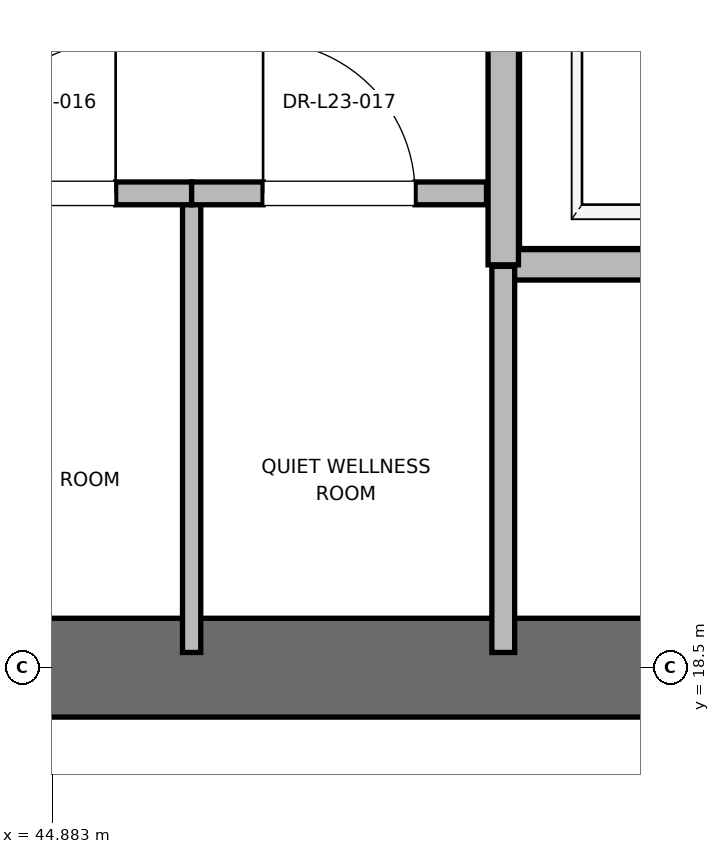
"""IFC4 building model, lengths in metres.
Left out: names, types, materials, properties, quantities, classifications, styles, units other than length and angle.
Written with IfcOpenShell. Run it as: python <this file> out.ifc"""

import sys

from ifc_helpers import new_model, si_unit, direction, frame, frame_2d, origin, place, context, subcontext, project, spatial, rectangle, extrude, element, fill, save


model = new_model("IFC4")
c1 = context("Model", 3, precision=1e-05, world=origin(), true_north=direction((0.0, 1.0)))
c2 = subcontext(c1, "Body", "Model", "MODEL_VIEW")
j1 = project(units=[si_unit("LENGTHUNIT", "METRE"), si_unit("PLANEANGLEUNIT", "RADIAN")], contexts=[c1])
p1 = place(None, origin())
s1 = spatial("IfcSite", under=j1, at=p1, CompositionType="ELEMENT")
p2 = place(p1, origin())
s2 = spatial("IfcBuilding", under=s1, at=p2, CompositionType="ELEMENT")
p3 = place(p2, frame((0.0, 0.0, 99.6)))
s3 = spatial("IfcBuildingStorey", under=s2, at=p3, CompositionType="ELEMENT", Elevation=99.6)
p4 = place(p3, frame((41.8, 18.5, 0.0), z_axis=(0.0, 0.0, 1.0), x_axis=(1.0, 0.0, 0.0)))
e1 = element("IfcWall", 1, at=p4, inside=s3, PredefinedType="SHEAR", context=c2, shape_type="SweptSolid", body=[
    extrude(rectangle(XDim=9.2, YDim=0.65, at=frame_2d((4.6, 0.0))), origin(), (0.0, 0.0, 1.0), 3.76),
])
p5 = place(p3, frame((47.85, 21.15, 0.0), z_axis=(0.0, 0.0, 1.0), x_axis=(1.0, 0.0, 0.0)))
e2 = element("IfcWall", 2, at=p5, inside=s3, PredefinedType="SOLIDWALL", context=c2, shape_type="SweptSolid", body=[
    extrude(rectangle(XDim=2.6, YDim=0.2, at=frame_2d((1.3, 0.0))), origin(), (0.0, 0.0, 1.0), 3.76),
])
p6 = place(p3, frame((47.85, 24.15, 0.0), z_axis=(0.0, 0.0, 1.0), x_axis=(0.0, -1.0, 0.0)))
e3 = element("IfcWall", 3, at=p6, inside=s3, PredefinedType="SOLIDWALL", context=c2, shape_type="SweptSolid", body=[
    extrude(rectangle(XDim=3.0, YDim=0.2, at=frame_2d((1.5, 0.0))), origin(), (0.0, 0.0, 1.0), 3.76),
])
p7 = place(p3, frame((47.85, 18.6, 0.0), z_axis=(0.0, 0.0, 1.0), x_axis=(0.0, 1.0, 0.0)))
e4 = element("IfcWall", 4, at=p7, inside=s3, PredefinedType="PARTITIONING", context=c2, shape_type="SweptSolid", body=[
    extrude(rectangle(XDim=2.54, YDim=0.15, at=frame_2d((1.27, 0.0))), origin(), (0.0, 0.0, 1.0), 2.85),
])
p8 = place(p3, frame((45.8, 18.6, 0.0), z_axis=(0.0, 0.0, 1.0), x_axis=(0.0, 1.0, 0.0)))
e5 = element("IfcWall", 5, at=p8, inside=s3, PredefinedType="PARTITIONING", context=c2, shape_type="SweptSolid", body=[
    extrude(rectangle(XDim=3.02, YDim=0.12, at=frame_2d((1.51, 0.0))), origin(), (0.0, 0.0, 1.0), 2.85),
])
p9 = place(p3, frame((43.8, 21.62, 0.0), z_axis=(0.0, 0.0, 1.0), x_axis=(1.0, 0.0, 0.0)))
e6 = element("IfcWall", 6, at=p9, inside=s3, PredefinedType="PARTITIONING", context=c2, shape_type="SweptSolid", body=[
    extrude(rectangle(XDim=2.0, YDim=0.15, at=frame_2d((1.0, 0.0))), origin(), (0.0, 0.0, 1.0), 2.85),
])
p10 = place(p9, frame((0.5, 0.0, 0.0)))
e7 = element("IfcOpeningElement", 7, at=p10, cuts=e6, PredefinedType="OPENING", context=c2, shape_type="SweptSolid", body=[
    extrude(rectangle(XDim=1.0, YDim=2.15, at=frame_2d((0.5, 1.075))), frame((0.0, 0.075, 0.0), z_axis=(0.0, -1.0, 0.0), x_axis=(1.0, 0.0, 0.0)), (0.0, 0.0, 1.0), 0.15),
])
p11 = place(p3, frame((45.8, 21.62, 0.0), z_axis=(0.0, 0.0, 1.0), x_axis=(1.0, 0.0, 0.0)))
e8 = element("IfcWall", 8, at=p11, inside=s3, PredefinedType="PARTITIONING", context=c2, shape_type="SweptSolid", body=[
    extrude(rectangle(XDim=1.94, YDim=0.15, at=frame_2d((0.97, 0.0))), origin(), (0.0, 0.0, 1.0), 2.85),
])
p12 = place(p11, frame((0.47, 0.0, 0.0)))
e9 = element("IfcOpeningElement", 9, at=p12, cuts=e8, PredefinedType="OPENING", context=c2, shape_type="SweptSolid", body=[
    extrude(rectangle(XDim=1.0, YDim=2.15, at=frame_2d((0.5, 1.075))), frame((0.0, 0.075, 0.0), z_axis=(0.0, -1.0, 0.0), x_axis=(1.0, 0.0, 0.0)), (0.0, 0.0, 1.0), 0.15),
])
p13 = place(p10, origin())
e10 = element("IfcDoor", 10, at=p13, inside=s3, OperationType="SINGLE_SWING_RIGHT", PredefinedType="DOOR", context=c2, shape_type="SweptSolid", body=[
    extrude(rectangle(XDim=1.0, YDim=2.15, at=frame_2d((0.5, 1.075))), frame((0.0, 0.025, 0.0), z_axis=(0.0, -1.0, 0.0), x_axis=(1.0, 0.0, 0.0)), (0.0, 0.0, 1.0), 0.05),
])
fill(e7, e10)
p14 = place(p12, origin())
e11 = element("IfcDoor", 11, at=p14, inside=s3, OperationType="SINGLE_SWING_LEFT", PredefinedType="DOOR", context=c2, shape_type="SweptSolid", body=[
    extrude(rectangle(XDim=1.0, YDim=2.15, at=frame_2d((0.5, 1.075))), frame((0.0, 0.025, 0.0), z_axis=(0.0, -1.0, 0.0), x_axis=(1.0, 0.0, 0.0)), (0.0, 0.0, 1.0), 0.05),
])
fill(e9, e11)
save(model, sys.argv[1])
